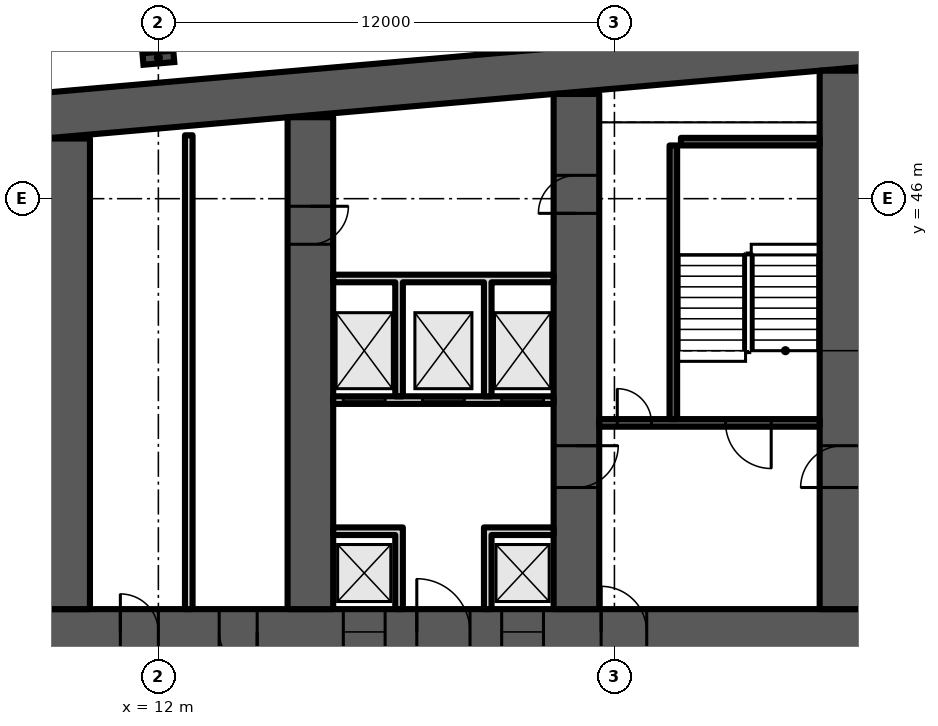
"""IFC4 building model, lengths in metres.
Left out: names, types, materials, properties, quantities, classifications, styles, units other than length and angle.
Written with IfcOpenShell. Run it as: python <this file> out.ifc"""

import sys

from ifc_helpers import new_model, si_unit, direction, frame, frame_2d, origin, origin_2d, place, context, subcontext, project, spatial, polyline, rectangle, i_section, outline, extrude, element, fill, save


model = new_model("IFC4")
c1 = context("Model", 3, precision=1e-05, world=origin(), true_north=direction((0.0, 1.0)))
c2 = subcontext(c1, "Body", "Model", "MODEL_VIEW")
j1 = project(units=[si_unit("LENGTHUNIT", "METRE"), si_unit("PLANEANGLEUNIT", "RADIAN")], contexts=[c1])
p1 = place(None, origin())
s1 = spatial("IfcSite", under=j1, at=p1, CompositionType="ELEMENT")
p2 = place(p1, origin())
s2 = spatial("IfcBuilding", under=s1, at=p2, CompositionType="ELEMENT")
p3 = place(p2, frame((0.0, 0.0, 45.1)))
s3 = spatial("IfcBuildingStorey", under=s2, at=p3, CompositionType="ELEMENT", Elevation=45.1)
p4 = place(p3, frame((0.0, 0.0, -0.0)))
e1 = element("IfcWall", 1, at=p4, inside=s3, PredefinedType="SHEAR", context=c2, shape_type="SweptSolid", body=[
    extrude(outline(polyline([(9.0, 47.583), (37.0, 50.032), (65.0, 47.583), (65.0, 48.787), (37.0, 51.237), (9.0, 48.787), (9.0, 47.583)])), origin(), (0.0, 0.0, 1.0), 3.6),
])
p5 = place(p3, frame((9.0, 34.6, 0.0), z_axis=(0.0, 0.0, 1.0), x_axis=(1.0, 0.0, 0.0)))
e2 = element("IfcWall", 2, at=p5, inside=s3, PredefinedType="SHEAR", context=c2, shape_type="SweptSolid", body=[
    extrude(rectangle(XDim=56.0, YDim=1.2, at=frame_2d((28.0, 0.0))), origin(), (0.0, 0.0, 1.0), 3.6),
])
p6 = place(p5, frame((2.0, 0.0, 0.0)))
e3 = element("IfcOpeningElement", 3, at=p6, cuts=e2, PredefinedType="OPENING", context=c2, shape_type="SweptSolid", body=[
    extrude(rectangle(XDim=1.0, YDim=2.1, at=frame_2d((0.5, 1.05))), frame((0.0, 0.61, 0.0), z_axis=(0.0, -1.0, 0.0), x_axis=(1.0, 0.0, 0.0)), (0.0, 0.0, 1.0), 1.22),
])
p7 = place(p5, frame((4.6, 0.0, 0.0)))
e4 = element("IfcOpeningElement", 4, at=p7, cuts=e2, PredefinedType="OPENING", context=c2, shape_type="SweptSolid", body=[
    extrude(rectangle(XDim=1.0, YDim=2.1, at=frame_2d((0.5, 1.05))), frame((0.0, 0.61, 0.0), z_axis=(0.0, -1.0, 0.0), x_axis=(1.0, 0.0, 0.0)), (0.0, 0.0, 1.0), 1.22),
])
p8 = place(p5, frame((7.867, 0.0, 0.0)))
e5 = element("IfcOpeningElement", 5, at=p8, cuts=e2, PredefinedType="OPENING", context=c2, shape_type="SweptSolid", body=[
    extrude(rectangle(XDim=1.1, YDim=2.1, at=frame_2d((0.55, 1.05))), frame((0.0, 0.61, 0.0), z_axis=(0.0, -1.0, 0.0), x_axis=(1.0, 0.0, 0.0)), (0.0, 0.0, 1.0), 1.22),
])
p9 = place(p5, frame((12.033, 0.0, 0.0)))
e6 = element("IfcOpeningElement", 6, at=p9, cuts=e2, PredefinedType="OPENING", context=c2, shape_type="SweptSolid", body=[
    extrude(rectangle(XDim=1.1, YDim=2.1, at=frame_2d((0.55, 1.05))), frame((0.0, 0.61, 0.0), z_axis=(0.0, -1.0, 0.0), x_axis=(1.0, 0.0, 0.0)), (0.0, 0.0, 1.0), 1.22),
])
p10 = place(p5, frame((9.8, 0.0, 0.0)))
e7 = element("IfcOpeningElement", 7, at=p10, cuts=e2, PredefinedType="OPENING", context=c2, shape_type="SweptSolid", body=[
    extrude(rectangle(XDim=1.4, YDim=2.1, at=frame_2d((0.7, 1.05))), frame((0.0, 0.61, 0.0), z_axis=(0.0, -1.0, 0.0), x_axis=(1.0, 0.0, 0.0)), (0.0, 0.0, 1.0), 1.22),
])
p11 = place(p5, frame((14.65, 0.0, 0.0)))
e8 = element("IfcOpeningElement", 8, at=p11, cuts=e2, PredefinedType="OPENING", context=c2, shape_type="SweptSolid", body=[
    extrude(rectangle(XDim=1.2, YDim=2.1, at=frame_2d((0.6, 1.05))), frame((0.0, 0.61, 0.0), z_axis=(0.0, -1.0, 0.0), x_axis=(1.0, 0.0, 0.0)), (0.0, 0.0, 1.0), 1.22),
])
p12 = place(p5, frame((21.867, 0.0, 0.0)))
e9 = element("IfcOpeningElement", 9, at=p12, cuts=e2, PredefinedType="OPENING", context=c2, shape_type="SweptSolid", body=[
    extrude(rectangle(XDim=1.1, YDim=2.1, at=frame_2d((0.55, 1.05))), frame((0.0, 0.61, 0.0), z_axis=(0.0, -1.0, 0.0), x_axis=(1.0, 0.0, 0.0)), (0.0, 0.0, 1.0), 1.22),
])
p13 = place(p5, frame((26.033, 0.0, 0.0)))
e10 = element("IfcOpeningElement", 10, at=p13, cuts=e2, PredefinedType="OPENING", context=c2, shape_type="SweptSolid", body=[
    extrude(rectangle(XDim=1.1, YDim=2.1, at=frame_2d((0.55, 1.05))), frame((0.0, 0.61, 0.0), z_axis=(0.0, -1.0, 0.0), x_axis=(1.0, 0.0, 0.0)), (0.0, 0.0, 1.0), 1.22),
])
p14 = place(p5, frame((23.8, 0.0, 0.0)))
e11 = element("IfcOpeningElement", 11, at=p14, cuts=e2, PredefinedType="OPENING", context=c2, shape_type="SweptSolid", body=[
    extrude(rectangle(XDim=1.4, YDim=2.1, at=frame_2d((0.7, 1.05))), frame((0.0, 0.61, 0.0), z_axis=(0.0, -1.0, 0.0), x_axis=(1.0, 0.0, 0.0)), (0.0, 0.0, 1.0), 1.22),
])
p15 = place(p5, frame((28.867, 0.0, 0.0)))
e12 = element("IfcOpeningElement", 12, at=p15, cuts=e2, PredefinedType="OPENING", context=c2, shape_type="SweptSolid", body=[
    extrude(rectangle(XDim=1.1, YDim=2.1, at=frame_2d((0.55, 1.05))), frame((0.0, 0.61, 0.0), z_axis=(0.0, -1.0, 0.0), x_axis=(1.0, 0.0, 0.0)), (0.0, 0.0, 1.0), 1.22),
])
p16 = place(p5, frame((33.033, 0.0, 0.0)))
e13 = element("IfcOpeningElement", 13, at=p16, cuts=e2, PredefinedType="OPENING", context=c2, shape_type="SweptSolid", body=[
    extrude(rectangle(XDim=1.1, YDim=2.1, at=frame_2d((0.55, 1.05))), frame((0.0, 0.61, 0.0), z_axis=(0.0, -1.0, 0.0), x_axis=(1.0, 0.0, 0.0)), (0.0, 0.0, 1.0), 1.22),
])
p17 = place(p5, frame((40.15, 0.0, 0.0)))
e14 = element("IfcOpeningElement", 14, at=p17, cuts=e2, PredefinedType="OPENING", context=c2, shape_type="SweptSolid", body=[
    extrude(rectangle(XDim=1.2, YDim=2.1, at=frame_2d((0.6, 1.05))), frame((0.0, 0.61, 0.0), z_axis=(0.0, -1.0, 0.0), x_axis=(1.0, 0.0, 0.0)), (0.0, 0.0, 1.0), 1.22),
])
p18 = place(p5, frame((44.8, 0.0, 0.0)))
e15 = element("IfcOpeningElement", 15, at=p18, cuts=e2, PredefinedType="OPENING", context=c2, shape_type="SweptSolid", body=[
    extrude(rectangle(XDim=1.4, YDim=2.1, at=frame_2d((0.7, 1.05))), frame((0.0, 0.61, 0.0), z_axis=(0.0, -1.0, 0.0), x_axis=(1.0, 0.0, 0.0)), (0.0, 0.0, 1.0), 1.22),
])
p19 = place(p5, frame((49.867, 0.0, 0.0)))
e16 = element("IfcOpeningElement", 16, at=p19, cuts=e2, PredefinedType="OPENING", context=c2, shape_type="SweptSolid", body=[
    extrude(rectangle(XDim=1.1, YDim=2.1, at=frame_2d((0.55, 1.05))), frame((0.0, 0.61, 0.0), z_axis=(0.0, -1.0, 0.0), x_axis=(1.0, 0.0, 0.0)), (0.0, 0.0, 1.0), 1.22),
])
p20 = place(p5, frame((53.5, 0.0, 0.0)))
e17 = element("IfcOpeningElement", 17, at=p20, cuts=e2, PredefinedType="OPENING", context=c2, shape_type="SweptSolid", body=[
    extrude(rectangle(XDim=1.1, YDim=2.1, at=frame_2d((0.55, 1.05))), frame((0.0, 0.61, 0.0), z_axis=(0.0, -1.0, 0.0), x_axis=(1.0, 0.0, 0.0)), (0.0, 0.0, 1.0), 1.22),
])
p21 = place(p5, frame((51.567, 0.0, 0.0)))
e18 = element("IfcOpeningElement", 18, at=p21, cuts=e2, PredefinedType="OPENING", context=c2, shape_type="SweptSolid", body=[
    extrude(rectangle(XDim=1.4, YDim=2.1, at=frame_2d((0.7, 1.05))), frame((0.0, 0.61, 0.0), z_axis=(0.0, -1.0, 0.0), x_axis=(1.0, 0.0, 0.0)), (0.0, 0.0, 1.0), 1.22),
])
p22 = place(p3, frame((9.6, 35.2, 0.0), z_axis=(0.0, 0.0, 1.0), x_axis=(0.0, 1.0, 0.0)))
e19 = element("IfcWall", 19, at=p22, inside=s3, PredefinedType="SHEAR", context=c2, shape_type="SweptSolid", body=[
    extrude(rectangle(XDim=12.383, YDim=1.2, at=frame_2d((6.191, 0.0))), origin(), (0.0, 0.0, 1.0), 3.6),
])
p23 = place(p3, frame((16.0, 35.2, 0.0), z_axis=(0.0, 0.0, 1.0), x_axis=(0.0, 1.0, 0.0)))
e20 = element("IfcWall", 20, at=p23, inside=s3, PredefinedType="SHEAR", context=c2, shape_type="SweptSolid", body=[
    extrude(rectangle(XDim=12.943, YDim=1.2, at=frame_2d((6.471, 0.0))), origin(), (0.0, 0.0, 1.0), 3.6),
])
p24 = place(p23, frame((9.6, 0.0, 0.0)))
e21 = element("IfcOpeningElement", 21, at=p24, cuts=e20, PredefinedType="OPENING", context=c2, shape_type="SweptSolid", body=[
    extrude(rectangle(XDim=1.0, YDim=2.1, at=frame_2d((0.5, 1.05))), frame((0.0, 0.61, 0.0), z_axis=(0.0, -1.0, 0.0), x_axis=(1.0, 0.0, 0.0)), (0.0, 0.0, 1.0), 1.22),
])
p25 = place(p3, frame((23.0, 35.2, 0.0), z_axis=(0.0, 0.0, 1.0), x_axis=(0.0, 1.0, 0.0)))
e22 = element("IfcWall", 22, at=p25, inside=s3, PredefinedType="SHEAR", context=c2, shape_type="SweptSolid", body=[
    extrude(rectangle(XDim=13.555, YDim=1.2, at=frame_2d((6.778, 0.0))), origin(), (0.0, 0.0, 1.0), 3.6),
])
p26 = place(p25, frame((10.414, 0.0, 0.0)))
e23 = element("IfcOpeningElement", 23, at=p26, cuts=e22, PredefinedType="OPENING", context=c2, shape_type="SweptSolid", body=[
    extrude(rectangle(XDim=1.0, YDim=2.1, at=frame_2d((0.5, 1.05))), frame((0.0, 0.61, 0.0), z_axis=(0.0, -1.0, 0.0), x_axis=(1.0, 0.0, 0.0)), (0.0, 0.0, 1.0), 1.22),
])
p27 = place(p25, frame((3.2, 0.0, 0.0)))
e24 = element("IfcOpeningElement", 24, at=p27, cuts=e22, PredefinedType="OPENING", context=c2, shape_type="SweptSolid", body=[
    extrude(rectangle(XDim=1.1, YDim=2.1, at=frame_2d((0.55, 1.05))), frame((0.0, 0.61, 0.0), z_axis=(0.0, -1.0, 0.0), x_axis=(1.0, 0.0, 0.0)), (0.0, 0.0, 1.0), 1.22),
])
p28 = place(p3, frame((30.0, 35.2, 0.0), z_axis=(0.0, 0.0, 1.0), x_axis=(0.0, 1.0, 0.0)))
e25 = element("IfcWall", 25, at=p28, inside=s3, PredefinedType="SHEAR", context=c2, shape_type="SweptSolid", body=[
    extrude(rectangle(XDim=14.168, YDim=1.2, at=frame_2d((7.084, 0.0))), origin(), (0.0, 0.0, 1.0), 3.6),
])
p29 = place(p28, frame((3.2, 0.0, 0.0)))
e26 = element("IfcOpeningElement", 26, at=p29, cuts=e25, PredefinedType="OPENING", context=c2, shape_type="SweptSolid", body=[
    extrude(rectangle(XDim=1.1, YDim=2.1, at=frame_2d((0.55, 1.05))), frame((0.0, 0.61, 0.0), z_axis=(0.0, -1.0, 0.0), x_axis=(1.0, 0.0, 0.0)), (0.0, 0.0, 1.0), 1.22),
])
p30 = place(p3, frame((12.0, 49.71, 0.0), z_axis=(0.0, 0.0, 1.0), x_axis=(-0.087156, 0.996197, 0.0)))
e27 = element("IfcColumn", 27, at=p30, inside=s3, PredefinedType="COLUMN", context=c2, shape_type="SweptSolid", body=[
    extrude(i_section(OverallWidth=0.303, OverallDepth=0.814, WebThickness=0.021, FlangeThickness=0.04, FilletRadius=0.03, at=origin_2d()), origin(), (0.0, 0.0, 1.0), 3.6),
])
p31 = place(p3, frame((12.8, 35.2, 0.0), z_axis=(0.0, 0.0, 1.0), x_axis=(0.0, 1.0, 0.0)))
e28 = element("IfcWall", 28, at=p31, inside=s3, PredefinedType="PARTITIONING", context=c2, shape_type="SweptSolid", body=[
    extrude(rectangle(XDim=12.468, YDim=0.2, at=frame_2d((6.234, 0.0))), origin(), (0.0, 0.0, 1.0), 3.2),
])
p32 = place(p3, frame((16.6, 40.7, 0.0), z_axis=(0.0, 0.0, 1.0), x_axis=(1.0, 0.0, 0.0)))
e29 = element("IfcWall", 29, at=p32, inside=s3, PredefinedType="PARTITIONING", context=c2, shape_type="SweptSolid", body=[
    extrude(rectangle(XDim=5.8, YDim=0.2, at=frame_2d((2.9, 0.0))), origin(), (0.0, 0.0, 1.0), 3.2),
])
p33 = place(p32, frame((0.267, 0.0, 0.0)))
e30 = element("IfcOpeningElement", 30, at=p33, cuts=e29, PredefinedType="OPENING", context=c2, shape_type="SweptSolid", body=[
    extrude(rectangle(XDim=1.1, YDim=2.1, at=frame_2d((0.55, 1.05))), frame((0.0, 0.11, 0.0), z_axis=(0.0, -1.0, 0.0), x_axis=(1.0, 0.0, 0.0)), (0.0, 0.0, 1.0), 0.22),
])
p34 = place(p32, frame((2.35, 0.0, 0.0)))
e31 = element("IfcOpeningElement", 31, at=p34, cuts=e29, PredefinedType="OPENING", context=c2, shape_type="SweptSolid", body=[
    extrude(rectangle(XDim=1.1, YDim=2.1, at=frame_2d((0.55, 1.05))), frame((0.0, 0.11, 0.0), z_axis=(0.0, -1.0, 0.0), x_axis=(1.0, 0.0, 0.0)), (0.0, 0.0, 1.0), 0.22),
])
p35 = place(p32, frame((4.433, 0.0, 0.0)))
e32 = element("IfcOpeningElement", 32, at=p35, cuts=e29, PredefinedType="OPENING", context=c2, shape_type="SweptSolid", body=[
    extrude(rectangle(XDim=1.1, YDim=2.1, at=frame_2d((0.55, 1.05))), frame((0.0, 0.11, 0.0), z_axis=(0.0, -1.0, 0.0), x_axis=(1.0, 0.0, 0.0)), (0.0, 0.0, 1.0), 0.22),
])
p36 = place(p3, frame((0.0, 0.0, -0.0)))
e33 = element("IfcWall", 33, at=p36, inside=s3, PredefinedType="PARTITIONING", context=c2, shape_type="SweptSolid", body=[
    extrude(outline(polyline([(18.233, 37.15), (16.6, 37.15), (16.6, 37.35), (18.233, 37.35), (18.433, 37.35), (18.433, 35.2), (18.233, 35.2), (18.233, 37.15)])), origin(), (0.0, 0.0, 1.0), 3.2),
])
p37 = place(p3, frame((0.0, 0.0, -0.0)))
e34 = element("IfcWall", 34, at=p37, inside=s3, PredefinedType="PARTITIONING", context=c2, shape_type="SweptSolid", body=[
    extrude(outline(polyline([(20.567, 37.35), (20.767, 37.35), (22.4, 37.35), (22.4, 37.15), (20.767, 37.15), (20.767, 35.2), (20.567, 35.2), (20.567, 37.35)])), origin(), (0.0, 0.0, 1.0), 3.2),
])
p38 = place(p3, frame((0.0, 0.0, -0.0)))
e35 = element("IfcWall", 35, at=p38, inside=s3, PredefinedType="PARTITIONING", context=c2, shape_type="SweptSolid", body=[
    extrude(outline(polyline([(18.433, 40.8), (18.233, 40.8), (18.233, 43.8), (16.6, 43.8), (16.6, 44.0), (22.4, 44.0), (22.4, 43.8), (20.767, 43.8), (20.767, 40.8), (20.567, 40.8), (20.567, 43.8), (18.433, 43.8), (18.433, 40.8)])), origin(), (0.0, 0.0, 1.0), 3.2),
])
p39 = place(p3, frame((23.6, 40.1, 0.0), z_axis=(0.0, 0.0, 1.0), x_axis=(1.0, 0.0, 0.0)))
e36 = element("IfcWall", 36, at=p39, inside=s3, PredefinedType="SHEAR", context=c2, shape_type="SweptSolid", body=[
    extrude(rectangle(XDim=5.8, YDim=0.2, at=frame_2d((2.9, 0.0))), origin(), (0.0, 0.0, 1.0), 3.2),
])
p40 = place(p39, frame((3.325, 0.0, 0.0)))
e37 = element("IfcOpeningElement", 37, at=p40, cuts=e36, PredefinedType="OPENING", context=c2, shape_type="SweptSolid", body=[
    extrude(rectangle(XDim=1.2, YDim=2.1, at=frame_2d((0.6, 1.05))), frame((0.0, 0.11, 0.0), z_axis=(0.0, -1.0, 0.0), x_axis=(1.0, 0.0, 0.0)), (0.0, 0.0, 1.0), 0.22),
])
p41 = place(p39, frame((0.475, 0.0, 0.0)))
e38 = element("IfcOpeningElement", 38, at=p41, cuts=e36, PredefinedType="OPENING", context=c2, shape_type="SweptSolid", body=[
    extrude(rectangle(XDim=0.9, YDim=2.1, at=frame_2d((0.45, 1.05))), frame((0.0, 0.11, 0.0), z_axis=(0.0, -1.0, 0.0), x_axis=(1.0, 0.0, 0.0)), (0.0, 0.0, 1.0), 0.22),
])
p42 = place(p3, frame((25.55, 40.2, 0.0), z_axis=(0.0, 0.0, 1.0), x_axis=(0.0, 1.0, 0.0)))
e39 = element("IfcWall", 39, at=p42, inside=s3, PredefinedType="SHEAR", context=c2, shape_type="SweptSolid", body=[
    extrude(rectangle(XDim=7.2, YDim=0.2, at=frame_2d((3.6, 0.0))), origin(), (0.0, 0.0, 1.0), 3.2),
])
p43 = place(p3, frame((25.75, 47.5, 0.0), z_axis=(0.0, 0.0, 1.0), x_axis=(1.0, 0.0, 0.0)))
e40 = element("IfcWall", 40, at=p43, inside=s3, PredefinedType="SHEAR", context=c2, shape_type="SweptSolid", body=[
    extrude(rectangle(XDim=3.65, YDim=0.2, at=frame_2d((1.825, 0.0))), origin(), (0.0, 0.0, 1.0), 3.2),
])
p44 = place(p6, origin())
e41 = element("IfcDoor", 41, at=p44, inside=s3, OperationType="SINGLE_SWING_LEFT", PredefinedType="DOOR", context=c2, shape_type="SweptSolid", body=[
    extrude(rectangle(XDim=1.0, YDim=2.1, at=frame_2d((0.5, 1.05))), frame((0.0, 0.6, 0.0), z_axis=(0.0, -1.0, 0.0), x_axis=(1.0, 0.0, 0.0)), (0.0, 0.0, 1.0), 1.199),
])
fill(e3, e41)
p45 = place(p7, origin())
e42 = element("IfcDoor", 42, at=p45, inside=s3, OperationType="SINGLE_SWING_RIGHT", PredefinedType="DOOR", context=c2, shape_type="SweptSolid", body=[
    extrude(rectangle(XDim=1.0, YDim=2.1, at=frame_2d((0.5, 1.05))), frame((0.0, 0.6, 0.0), z_axis=(0.0, -1.0, 0.0), x_axis=(1.0, 0.0, 0.0)), (0.0, 0.0, 1.0), 1.199),
])
fill(e4, e42)
p46 = place(p8, origin())
e43 = element("IfcDoor", 43, at=p46, inside=s3, OperationType="DOUBLE_DOOR_SLIDING", PredefinedType="DOOR", context=c2, shape_type="SweptSolid", body=[
    extrude(rectangle(XDim=1.1, YDim=2.1, at=frame_2d((0.55, 1.05))), frame((0.0, 0.025, 0.0), z_axis=(0.0, -1.0, 0.0), x_axis=(1.0, 0.0, 0.0)), (0.0, 0.0, 1.0), 0.05),
])
fill(e5, e43)
p47 = place(p9, origin())
e44 = element("IfcDoor", 44, at=p47, inside=s3, OperationType="DOUBLE_DOOR_SLIDING", PredefinedType="DOOR", context=c2, shape_type="SweptSolid", body=[
    extrude(rectangle(XDim=1.1, YDim=2.1, at=frame_2d((0.55, 1.05))), frame((0.0, 0.025, 0.0), z_axis=(0.0, -1.0, 0.0), x_axis=(1.0, 0.0, 0.0)), (0.0, 0.0, 1.0), 0.05),
])
fill(e6, e44)
p48 = place(p10, origin())
e45 = element("IfcDoor", 45, at=p48, inside=s3, OperationType="DOUBLE_DOOR_SINGLE_SWING", PredefinedType="DOOR", context=c2, shape_type="SweptSolid", body=[
    extrude(rectangle(XDim=1.4, YDim=2.1, at=frame_2d((0.7, 1.05))), frame((0.0, 0.025, 0.0), z_axis=(0.0, -1.0, 0.0), x_axis=(1.0, 0.0, 0.0)), (0.0, 0.0, 1.0), 0.05),
])
fill(e7, e45)
p49 = place(p33, origin())
e46 = element("IfcDoor", 46, at=p49, inside=s3, OperationType="DOUBLE_DOOR_SLIDING", PredefinedType="DOOR", context=c2, shape_type="SweptSolid", body=[
    extrude(rectangle(XDim=1.1, YDim=2.1, at=frame_2d((0.55, 1.05))), frame((0.0, 0.025, 0.0), z_axis=(0.0, -1.0, 0.0), x_axis=(1.0, 0.0, 0.0)), (0.0, 0.0, 1.0), 0.05),
])
fill(e30, e46)
p50 = place(p34, origin())
e47 = element("IfcDoor", 47, at=p50, inside=s3, OperationType="DOUBLE_DOOR_SLIDING", PredefinedType="DOOR", context=c2, shape_type="SweptSolid", body=[
    extrude(rectangle(XDim=1.1, YDim=2.1, at=frame_2d((0.55, 1.05))), frame((0.0, 0.025, 0.0), z_axis=(0.0, -1.0, 0.0), x_axis=(1.0, 0.0, 0.0)), (0.0, 0.0, 1.0), 0.05),
])
fill(e31, e47)
p51 = place(p35, origin())
e48 = element("IfcDoor", 48, at=p51, inside=s3, OperationType="DOUBLE_DOOR_SLIDING", PredefinedType="DOOR", context=c2, shape_type="SweptSolid", body=[
    extrude(rectangle(XDim=1.1, YDim=2.1, at=frame_2d((0.55, 1.05))), frame((0.0, 0.025, 0.0), z_axis=(0.0, -1.0, 0.0), x_axis=(1.0, 0.0, 0.0)), (0.0, 0.0, 1.0), 0.05),
])
fill(e32, e48)
p52 = place(p26, origin())
e49 = element("IfcDoor", 49, at=p52, inside=s3, OperationType="SINGLE_SWING_LEFT", PredefinedType="DOOR", context=c2, shape_type="SweptSolid", body=[
    extrude(rectangle(XDim=1.0, YDim=2.1, at=frame_2d((0.5, 1.05))), frame((0.0, 0.6, 0.0), z_axis=(0.0, -1.0, 0.0), x_axis=(1.0, 0.0, 0.0)), (0.0, 0.0, 1.0), 1.199),
])
fill(e23, e49)
p53 = place(p40, origin())
e50 = element("IfcDoor", 50, at=p53, inside=s3, OperationType="SINGLE_SWING_RIGHT", PredefinedType="DOOR", context=c2, shape_type="SweptSolid", body=[
    extrude(rectangle(XDim=1.2, YDim=2.1, at=frame_2d((0.6, 1.05))), frame((0.0, 0.025, 0.0), z_axis=(0.0, -1.0, 0.0), x_axis=(1.0, 0.0, 0.0)), (0.0, 0.0, 1.0), 0.05),
])
fill(e37, e50)
p54 = place(p41, origin())
e51 = element("IfcDoor", 51, at=p54, inside=s3, OperationType="SINGLE_SWING_LEFT", PredefinedType="DOOR", context=c2, shape_type="SweptSolid", body=[
    extrude(rectangle(XDim=0.9, YDim=2.1, at=frame_2d((0.45, 1.05))), frame((0.0, 0.025, 0.0), z_axis=(0.0, -1.0, 0.0), x_axis=(1.0, 0.0, 0.0)), (0.0, 0.0, 1.0), 0.05),
])
fill(e38, e51)
p55 = place(p11, origin())
e52 = element("IfcDoor", 52, at=p55, inside=s3, OperationType="SINGLE_SWING_LEFT", PredefinedType="DOOR", context=c2, shape_type="SweptSolid", body=[
    extrude(rectangle(XDim=1.2, YDim=2.1, at=frame_2d((0.6, 1.05))), frame((0.0, 0.025, 0.0), z_axis=(0.0, -1.0, 0.0), x_axis=(1.0, 0.0, 0.0)), (0.0, 0.0, 1.0), 0.05),
])
fill(e8, e52)
p56 = place(p24, origin())
e53 = element("IfcDoor", 53, at=p56, inside=s3, OperationType="SINGLE_SWING_RIGHT", PredefinedType="DOOR", context=c2, shape_type="SweptSolid", body=[
    extrude(rectangle(XDim=1.0, YDim=2.1, at=frame_2d((0.5, 1.05))), frame((0.0, 0.6, 0.0), z_axis=(0.0, -1.0, 0.0), x_axis=(1.0, 0.0, 0.0)), (0.0, 0.0, 1.0), 1.199),
])
fill(e21, e53)
p57 = place(p27, origin())
e54 = element("IfcDoor", 54, at=p57, inside=s3, OperationType="SINGLE_SWING_RIGHT", PredefinedType="DOOR", context=c2, shape_type="SweptSolid", body=[
    extrude(rectangle(XDim=1.1, YDim=2.1, at=frame_2d((0.55, 1.05))), frame((0.0, 0.025, 0.0), z_axis=(0.0, -1.0, 0.0), x_axis=(1.0, 0.0, 0.0)), (0.0, 0.0, 1.0), 0.05),
])
fill(e24, e54)
p58 = place(p29, origin())
e55 = element("IfcDoor", 55, at=p58, inside=s3, OperationType="SINGLE_SWING_LEFT", PredefinedType="DOOR", context=c2, shape_type="SweptSolid", body=[
    extrude(rectangle(XDim=1.1, YDim=2.1, at=frame_2d((0.55, 1.05))), frame((0.0, 0.025, 0.0), z_axis=(0.0, -1.0, 0.0), x_axis=(1.0, 0.0, 0.0)), (0.0, 0.0, 1.0), 0.05),
])
fill(e26, e55)
save(model, sys.argv[1])
